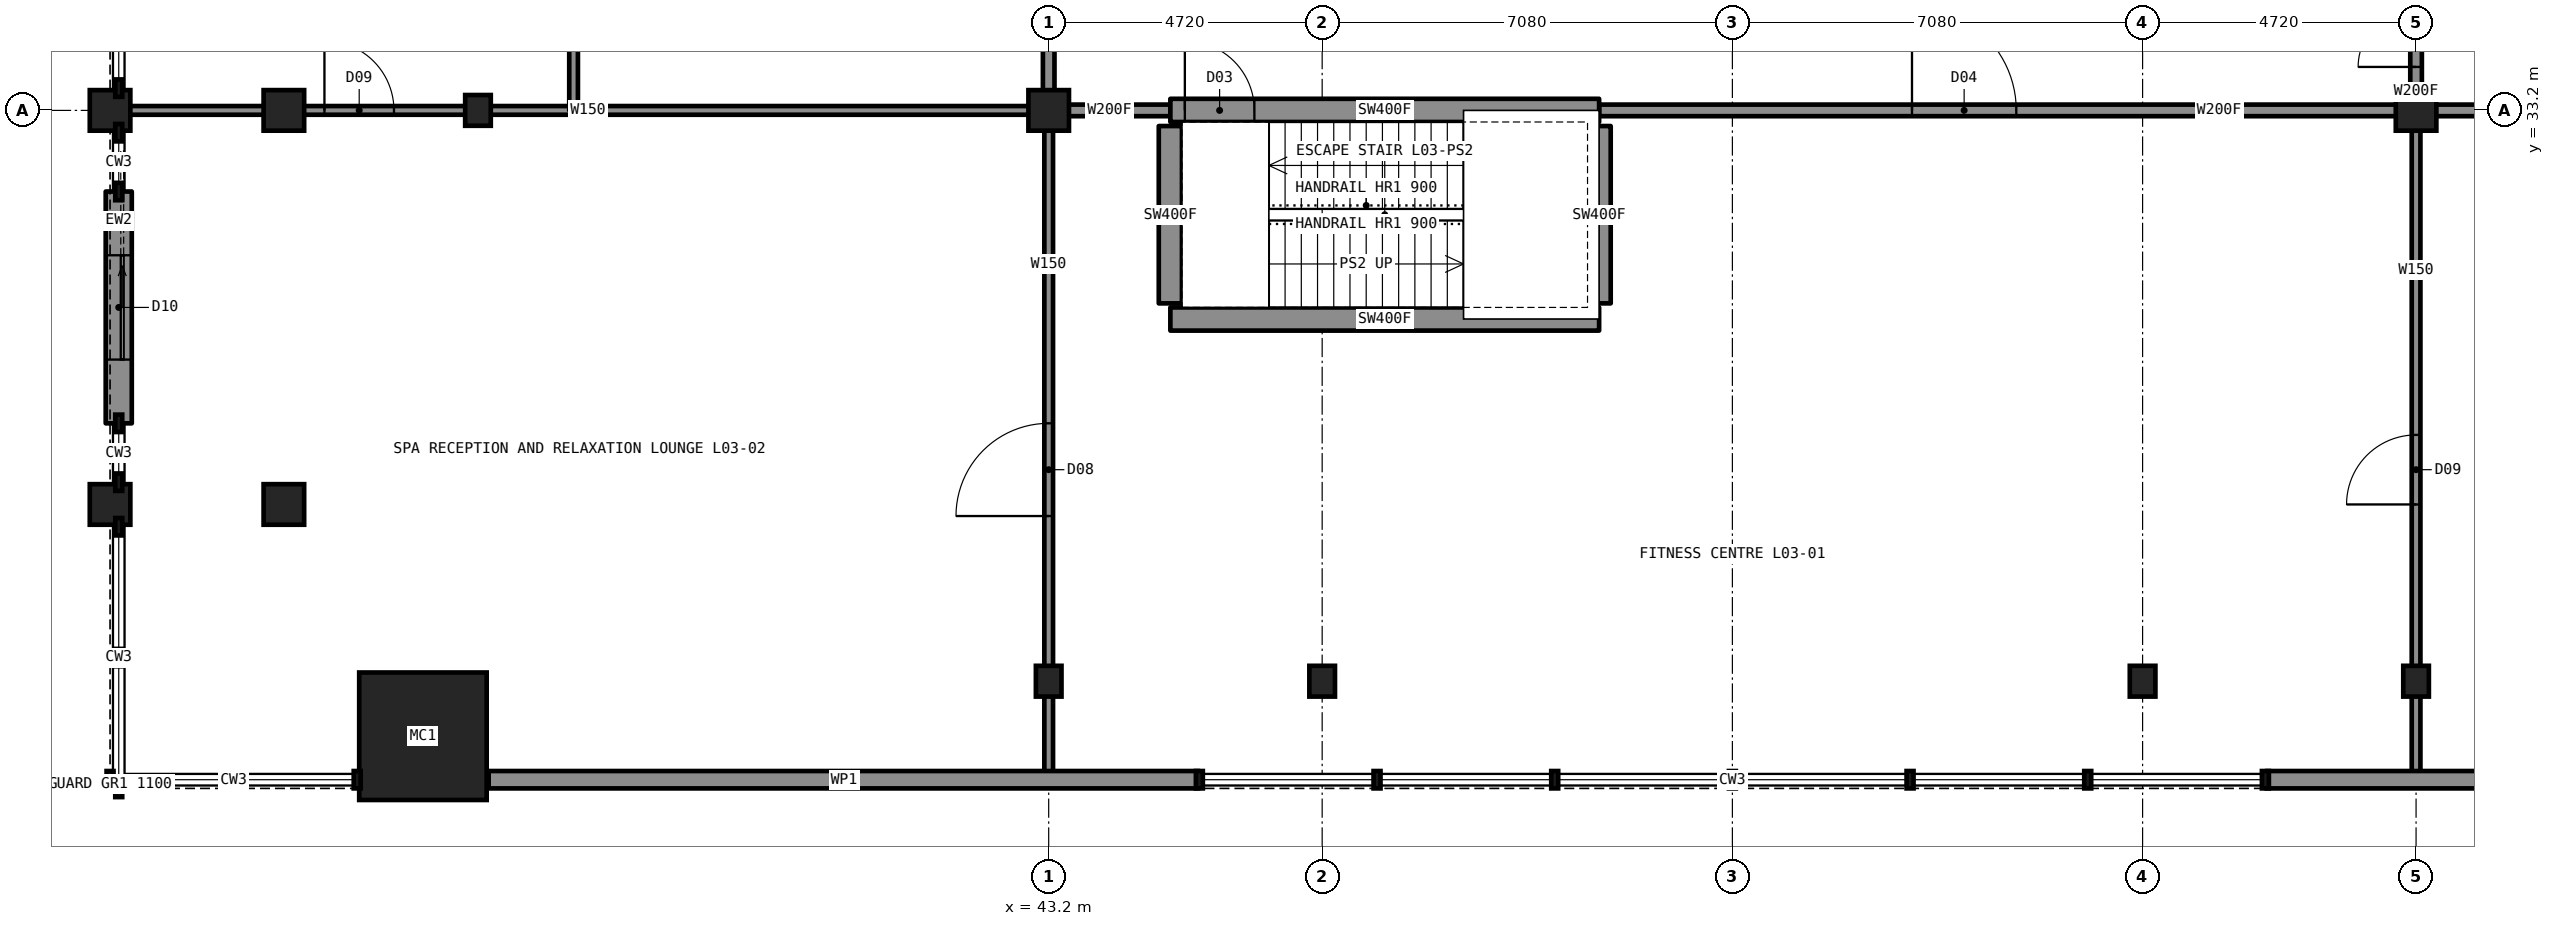
"""IFC4 building model, lengths in metres.
Left out: names, types, materials, properties, quantities, classifications, styles, units other than length and angle.
Written with IfcOpenShell. Run it as: python <this file> out.ifc"""

import sys

from ifc_helpers import new_model, si_unit, direction, frame, frame_2d, origin, origin_2d, place, context, subcontext, project, spatial, rectangle, hollow_rectangle, i_section, extrude, element, fill, save


model = new_model("IFC4")
c1 = context("Model", 3, precision=1e-05, world=origin(), true_north=direction((0.0, 1.0)))
c2 = subcontext(c1, "Body", "Model", "MODEL_VIEW")
j1 = project(units=[si_unit("LENGTHUNIT", "METRE"), si_unit("PLANEANGLEUNIT", "RADIAN")], contexts=[c1])
p1 = place(None, origin())
s1 = spatial("IfcSite", under=j1, at=p1, CompositionType="ELEMENT")
p2 = place(p1, origin())
s2 = spatial("IfcBuilding", under=s1, at=p2, CompositionType="ELEMENT")
p3 = place(p2, frame((0.0, 0.0, 16.0)))
s3 = spatial("IfcBuildingStorey", under=s2, at=p3, CompositionType="ELEMENT", Elevation=16.0)
for number, where, z_axis, x_axis in (
    (1, (33.35, 33.2, 0.0), (0.0, 0.0, 1.0), (1.0, 0.0, 0.0)),
    (2, (43.2, 23.35, 0.0), (0.0, 0.0, 1.0), (1.0, 0.0, 0.0)),
    (3, (47.92, 23.35, 0.0), (0.0, 0.0, 1.0), (1.0, 0.0, 0.0)),
    (4, (62.08, 23.35, 0.0), (0.0, 0.0, 1.0), (1.0, 0.0, 0.0)),
    (5, (66.8, 23.35, 0.0), (0.0, 0.0, 1.0), (1.0, 0.0, 0.0)),
):
    element("IfcColumn", number, at=place(p3, frame(where, z_axis=z_axis, x_axis=x_axis)), inside=s3, PredefinedType="COLUMN", context=c2, shape_type="SweptSolid", body=[
        extrude(i_section(OverallWidth=0.442, OverallDepth=0.531, WebThickness=0.066, FlangeThickness=0.106, at=origin_2d()), origin(), (0.0, 0.0, 1.0), 4.5),
    ])
for number, where, z_axis, x_axis in (
    (6, (43.2, 33.2, 0.0), (0.0, 0.0, 1.0), (1.0, 0.0, 0.0)),
    (7, (66.8, 33.2, 0.0), (0.0, 0.0, 1.0), (1.0, 0.0, 0.0)),
):
    element("IfcColumn", number, at=place(p3, frame(where, z_axis=z_axis, x_axis=x_axis)), inside=s3, PredefinedType="COLUMN", context=c2, shape_type="SweptSolid", body=[
        extrude(hollow_rectangle(XDim=0.7, YDim=0.7, WallThickness=0.06, at=origin_2d()), origin(), (0.0, 0.0, 1.0), 4.5),
    ])
p4 = place(p3, frame((32.4, 22.4, 0.0), z_axis=(0.0, 0.0, 1.0), x_axis=(1.0, 0.0, 0.0)))
e8 = element("IfcColumn", 8, at=p4, inside=s3, PredefinedType="COLUMN", context=c2, shape_type="SweptSolid", body=[
    extrude(hollow_rectangle(XDim=2.2, YDim=2.2, WallThickness=0.15, at=origin_2d()), origin(), (0.0, 0.0, 1.0), 4.5),
])
for number, where, z_axis, x_axis in (
    (9, (27.0, 26.4, 0.0), (0.0, 0.0, 1.0), (1.0, 0.0, 0.0)),
    (10, (27.0, 33.2, 0.0), (0.0, 0.0, 1.0), (1.0, 0.0, 0.0)),
    (11, (30.0, 26.4, 0.0), (0.0, 0.0, 1.0), (1.0, 0.0, 0.0)),
    (12, (30.0, 33.2, 0.0), (0.0, 0.0, 1.0), (1.0, 0.0, 0.0)),
):
    element("IfcColumn", number, at=place(p3, frame(where, z_axis=z_axis, x_axis=x_axis)), inside=s3, PredefinedType="COLUMN", context=c2, shape_type="SweptSolid", body=[
        extrude(rectangle(XDim=0.7, YDim=0.7, at=origin_2d()), origin(), (0.0, 0.0, 1.0), 4.5),
    ])
p5 = place(p3, frame((43.2, 33.2, 0.0), z_axis=(0.0, 0.0, 1.0), x_axis=(1.0, 0.0, 0.0)))
e13 = element("IfcWall", 13, at=p5, inside=s3, PredefinedType="PARTITIONING", context=c2, shape_type="SweptSolid", body=[
    extrude(rectangle(XDim=2.1, YDim=0.2, at=frame_2d((1.05, 0.0))), origin(), (0.0, 0.0, 1.0), 4.15),
])
p6 = place(p3, frame((52.7, 33.2, 0.0), z_axis=(0.0, 0.0, 1.0), x_axis=(1.0, 0.0, 0.0)))
e14 = element("IfcWall", 14, at=p6, inside=s3, PredefinedType="PARTITIONING", context=c2, shape_type="SweptSolid", body=[
    extrude(rectangle(XDim=14.1, YDim=0.2, at=frame_2d((7.05, 0.0))), origin(), (0.0, 0.0, 1.0), 4.15),
])
p7 = place(p6, frame((5.4, 0.0, 0.0)))
e15 = element("IfcOpeningElement", 15, at=p7, cuts=e14, PredefinedType="OPENING", context=c2, shape_type="SweptSolid", body=[
    extrude(rectangle(XDim=1.8, YDim=2.2, at=frame_2d((0.9, 1.1))), frame((0.0, 0.11, 0.0), z_axis=(0.0, -1.0, 0.0), x_axis=(1.0, 0.0, 0.0)), (0.0, 0.0, 1.0), 0.22),
])
p8 = place(p3, frame((66.8, 33.2, 0.0), z_axis=(0.0, 0.0, 1.0), x_axis=(1.0, 0.0, 0.0)))
e16 = element("IfcWall", 16, at=p8, inside=s3, PredefinedType="PARTITIONING", context=c2, shape_type="SweptSolid", body=[
    extrude(rectangle(XDim=12.9, YDim=0.2, at=frame_2d((6.45, 0.0))), origin(), (0.0, 0.0, 1.0), 4.15),
])
p9 = place(p3, frame((27.3, 33.2, 0.0), z_axis=(0.0, 0.0, 1.0), x_axis=(1.0, 0.0, 0.0)))
e17 = element("IfcWall", 17, at=p9, inside=s3, PredefinedType="PARTITIONING", context=c2, shape_type="SweptSolid", body=[
    extrude(rectangle(XDim=15.9, YDim=0.15, at=frame_2d((7.95, 0.0))), origin(), (0.0, 0.0, 1.0), 4.15),
])
p10 = place(p9, frame((3.4, 0.0, 0.0)))
e18 = element("IfcOpeningElement", 18, at=p10, cuts=e17, PredefinedType="OPENING", context=c2, shape_type="SweptSolid", body=[
    extrude(rectangle(XDim=1.2, YDim=2.2, at=frame_2d((0.6, 1.1))), frame((0.0, 0.085, 0.0), z_axis=(0.0, -1.0, 0.0), x_axis=(1.0, 0.0, 0.0)), (0.0, 0.0, 1.0), 0.17),
])
p11 = place(p3, frame((45.3, 33.2, 0.0), z_axis=(0.0, 0.0, 1.0), x_axis=(1.0, 0.0, 0.0)))
e19 = element("IfcWall", 19, at=p11, inside=s3, PredefinedType="SHEAR", context=c2, shape_type="SweptSolid", body=[
    extrude(rectangle(XDim=7.4, YDim=0.4, at=frame_2d((3.7, 0.0))), origin(), (0.0, 0.0, 1.0), 4.5),
])
p12 = place(p11, frame((0.25, 0.0, 0.0)))
e20 = element("IfcOpeningElement", 20, at=p12, cuts=e19, PredefinedType="OPENING", context=c2, shape_type="SweptSolid", body=[
    extrude(rectangle(XDim=1.2, YDim=2.2, at=frame_2d((0.6, 1.1))), frame((0.0, 0.21, 0.0), z_axis=(0.0, -1.0, 0.0), x_axis=(1.0, 0.0, 0.0)), (0.0, 0.0, 1.0), 0.42),
])
p13 = place(p3, frame((45.3, 29.6, 0.0), z_axis=(0.0, 0.0, 1.0), x_axis=(1.0, 0.0, 0.0)))
e21 = element("IfcWall", 21, at=p13, inside=s3, PredefinedType="SHEAR", context=c2, shape_type="SweptSolid", body=[
    extrude(rectangle(XDim=7.4, YDim=0.4, at=frame_2d((3.7, 0.0))), origin(), (0.0, 0.0, 1.0), 4.5),
])
p14 = place(p3, frame((43.2, 33.2, 0.0), z_axis=(0.0, 0.0, 1.0), x_axis=(0.0, 1.0, 0.0)))
e22 = element("IfcWall", 22, at=p14, inside=s3, PredefinedType="PARTITIONING", context=c2, shape_type="SweptSolid", body=[
    extrude(rectangle(XDim=14.1, YDim=0.2, at=frame_2d((7.05, 0.0))), origin(), (0.0, 0.0, 1.0), 4.15),
])
p15 = place(p14, frame((12.4, 0.0, 0.0)))
e23 = element("IfcOpeningElement", 23, at=p15, cuts=e22, PredefinedType="OPENING", context=c2, shape_type="SweptSolid", body=[
    extrude(rectangle(XDim=1.0, YDim=2.1, at=frame_2d((0.5, 1.05))), frame((0.0, 0.11, 0.0), z_axis=(0.0, -1.0, 0.0), x_axis=(1.0, 0.0, 0.0)), (0.0, 0.0, 1.0), 0.22),
])
p16 = place(p14, frame((2.45, 0.0, 0.0)))
e24 = element("IfcOpeningElement", 24, at=p16, cuts=e22, PredefinedType="OPENING", context=c2, shape_type="SweptSolid", body=[
    extrude(rectangle(XDim=0.9, YDim=2.1, at=frame_2d((0.45, 1.05))), frame((0.0, 0.11, 0.0), z_axis=(0.0, -1.0, 0.0), x_axis=(1.0, 0.0, 0.0)), (0.0, 0.0, 1.0), 0.22),
])
p17 = place(p14, frame((8.25, 0.0, 0.0)))
e25 = element("IfcOpeningElement", 25, at=p17, cuts=e22, PredefinedType="OPENING", context=c2, shape_type="SweptSolid", body=[
    extrude(rectangle(XDim=0.9, YDim=2.1, at=frame_2d((0.45, 1.05))), frame((0.0, 0.11, 0.0), z_axis=(0.0, -1.0, 0.0), x_axis=(1.0, 0.0, 0.0)), (0.0, 0.0, 1.0), 0.22),
])
p18 = place(p3, frame((43.2, 21.755, 0.0), z_axis=(0.0, 0.0, 1.0), x_axis=(0.0, 1.0, 0.0)))
e26 = element("IfcWall", 26, at=p18, inside=s3, PredefinedType="PARTITIONING", context=c2, shape_type="SweptSolid", body=[
    extrude(rectangle(XDim=11.445, YDim=0.15, at=frame_2d((5.723, 0.0))), origin(), (0.0, 0.0, 1.0), 4.15),
])
p19 = place(p18, frame((4.445, 0.0, 0.0)))
e27 = element("IfcOpeningElement", 27, at=p19, cuts=e26, PredefinedType="OPENING", context=c2, shape_type="SweptSolid", body=[
    extrude(rectangle(XDim=1.6, YDim=2.4, at=frame_2d((0.8, 1.2))), frame((0.0, 0.085, 0.0), z_axis=(0.0, -1.0, 0.0), x_axis=(1.0, 0.0, 0.0)), (0.0, 0.0, 1.0), 0.17),
])
p20 = place(p3, frame((52.7, 29.87, 0.0), z_axis=(0.0, 0.0, 1.0), x_axis=(0.0, 1.0, 0.0)))
e28 = element("IfcWall", 28, at=p20, inside=s3, PredefinedType="SHEAR", context=c2, shape_type="SweptSolid", body=[
    extrude(rectangle(XDim=3.06, YDim=0.4, at=frame_2d((1.53, 0.0))), origin(), (0.0, 0.0, 1.0), 4.5),
])
p21 = place(p3, frame((35.0, 33.2, 0.0), z_axis=(0.0, 0.0, 1.0), x_axis=(0.0, 1.0, 0.0)))
e29 = element("IfcWall", 29, at=p21, inside=s3, PredefinedType="PARTITIONING", context=c2, shape_type="SweptSolid", body=[
    extrude(rectangle(XDim=23.6, YDim=0.15, at=frame_2d((11.8, 0.0))), origin(), (0.0, 0.0, 1.0), 4.15),
])
p22 = place(p3, frame((45.3, 29.87, 0.0), z_axis=(0.0, 0.0, 1.0), x_axis=(0.0, 1.0, 0.0)))
e30 = element("IfcWall", 30, at=p22, inside=s3, PredefinedType="SHEAR", context=c2, shape_type="SweptSolid", body=[
    extrude(rectangle(XDim=3.06, YDim=0.4, at=frame_2d((1.53, 0.0))), origin(), (0.0, 0.0, 1.0), 4.5),
])
p23 = place(p3, frame((66.8, 33.2, 0.0), z_axis=(0.0, 0.0, 1.0), x_axis=(0.0, 1.0, 0.0)))
e31 = element("IfcWall", 31, at=p23, inside=s3, PredefinedType="PARTITIONING", context=c2, shape_type="SweptSolid", body=[
    extrude(rectangle(XDim=2.1, YDim=0.2, at=frame_2d((1.05, 0.0))), origin(), (0.0, 0.0, 1.0), 4.15),
])
p24 = place(p23, frame((0.75, 0.0, 0.0)))
e32 = element("IfcOpeningElement", 32, at=p24, cuts=e31, PredefinedType="OPENING", context=c2, shape_type="SweptSolid", body=[
    extrude(rectangle(XDim=1.0, YDim=2.1, at=frame_2d((0.5, 1.05))), frame((0.0, 0.11, 0.0), z_axis=(0.0, -1.0, 0.0), x_axis=(1.0, 0.0, 0.0)), (0.0, 0.0, 1.0), 0.22),
])
p25 = place(p3, frame((66.8, 21.755, 0.0), z_axis=(0.0, 0.0, 1.0), x_axis=(0.0, 1.0, 0.0)))
e33 = element("IfcWall", 33, at=p25, inside=s3, PredefinedType="PARTITIONING", context=c2, shape_type="SweptSolid", body=[
    extrude(rectangle(XDim=11.445, YDim=0.15, at=frame_2d((5.723, 0.0))), origin(), (0.0, 0.0, 1.0), 4.15),
])
p26 = place(p25, frame((4.645, 0.0, 0.0)))
e34 = element("IfcOpeningElement", 34, at=p26, cuts=e33, PredefinedType="OPENING", context=c2, shape_type="SweptSolid", body=[
    extrude(rectangle(XDim=1.2, YDim=2.2, at=frame_2d((0.6, 1.1))), frame((0.0, 0.085, 0.0), z_axis=(0.0, -1.0, 0.0), x_axis=(1.0, 0.0, 0.0)), (0.0, 0.0, 1.0), 0.17),
])
p27 = place(p3, frame((27.15, 31.8, 0.0), z_axis=(0.0, 0.0, 1.0), x_axis=(0.0, -1.0, 0.0)))
e35 = element("IfcWall", 35, at=p27, inside=s3, PredefinedType="SOLIDWALL", context=c2, shape_type="SweptSolid", body=[
    extrude(rectangle(XDim=4.0, YDim=0.45, at=frame_2d((2.0, 0.0))), origin(), (0.0, 0.0, 1.0), 4.15),
])
p28 = place(p27, frame((1.1, 0.0, 0.0)))
e36 = element("IfcOpeningElement", 36, at=p28, cuts=e35, PredefinedType="OPENING", context=c2, shape_type="SweptSolid", body=[
    extrude(rectangle(XDim=1.8, YDim=2.4, at=frame_2d((0.9, 1.2))), frame((0.0, 0.235, 0.0), z_axis=(0.0, -1.0, 0.0), x_axis=(1.0, 0.0, 0.0)), (0.0, 0.0, 1.0), 0.47),
])
for number, where, z_axis, x_axis in (
    (37, (33.534, 21.65, 0.0), (0.0, 0.0, 1.0), (1.0, 0.0, 0.0)),
    (38, (64.199, 21.65, 0.0), (0.0, 0.0, 1.0), (1.0, 0.0, 0.0)),
):
    element("IfcWall", number, at=place(p3, frame(where, z_axis=z_axis, x_axis=x_axis)), inside=s3, PredefinedType="SOLIDWALL", context=c2, shape_type="SweptSolid", body=[
        extrude(rectangle(XDim=12.266, YDim=0.3, at=frame_2d((6.133, 0.0))), origin(), (0.0, 0.0, 1.0), 4.15),
    ])
p29 = place(p12, origin())
e39 = element("IfcDoor", 39, at=p29, inside=s3, OperationType="SINGLE_SWING_LEFT", PredefinedType="DOOR", context=c2, shape_type="SweptSolid", body=[
    extrude(rectangle(XDim=1.2, YDim=2.2, at=frame_2d((0.6, 1.1))), frame((0.0, 0.025, 0.0), z_axis=(0.0, -1.0, 0.0), x_axis=(1.0, 0.0, 0.0)), (0.0, 0.0, 1.0), 0.05),
])
fill(e20, e39)
p30 = place(p7, origin())
e40 = element("IfcDoor", 40, at=p30, inside=s3, OperationType="DOUBLE_DOOR_SINGLE_SWING", PredefinedType="DOOR", context=c2, shape_type="SweptSolid", body=[
    extrude(rectangle(XDim=1.8, YDim=2.2, at=frame_2d((0.9, 1.1))), frame((0.0, 0.025, 0.0), z_axis=(0.0, -1.0, 0.0), x_axis=(1.0, 0.0, 0.0)), (0.0, 0.0, 1.0), 0.05),
])
fill(e15, e40)
p31 = place(p19, origin())
e41 = element("IfcDoor", 41, at=p31, inside=s3, OperationType="DOUBLE_DOOR_SINGLE_SWING", PredefinedType="DOOR", context=c2, shape_type="SweptSolid", body=[
    extrude(rectangle(XDim=1.6, YDim=2.4, at=frame_2d((0.8, 1.2))), frame((0.0, 0.025, 0.0), z_axis=(0.0, -1.0, 0.0), x_axis=(1.0, 0.0, 0.0)), (0.0, 0.0, 1.0), 0.05),
])
fill(e27, e41)
p32 = place(p26, origin())
e42 = element("IfcDoor", 42, at=p32, inside=s3, OperationType="SINGLE_SWING_LEFT", PredefinedType="DOOR", context=c2, shape_type="SweptSolid", body=[
    extrude(rectangle(XDim=1.2, YDim=2.2, at=frame_2d((0.6, 1.1))), frame((0.0, 0.025, 0.0), z_axis=(0.0, -1.0, 0.0), x_axis=(1.0, 0.0, 0.0)), (0.0, 0.0, 1.0), 0.05),
])
fill(e34, e42)
p33 = place(p10, origin())
e43 = element("IfcDoor", 43, at=p33, inside=s3, OperationType="SINGLE_SWING_LEFT", PredefinedType="DOOR", context=c2, shape_type="SweptSolid", body=[
    extrude(rectangle(XDim=1.2, YDim=2.2, at=frame_2d((0.6, 1.1))), frame((0.0, 0.025, 0.0), z_axis=(0.0, -1.0, 0.0), x_axis=(1.0, 0.0, 0.0)), (0.0, 0.0, 1.0), 0.05),
])
fill(e18, e43)
p34 = place(p24, origin())
e44 = element("IfcDoor", 44, at=p34, inside=s3, OperationType="SINGLE_SWING_LEFT", PredefinedType="DOOR", context=c2, shape_type="SweptSolid", body=[
    extrude(rectangle(XDim=1.0, YDim=2.1, at=frame_2d((0.5, 1.05))), frame((0.0, 0.025, 0.0), z_axis=(0.0, -1.0, 0.0), x_axis=(1.0, 0.0, 0.0)), (0.0, 0.0, 1.0), 0.05),
])
fill(e32, e44)
p35 = place(p28, origin())
e45 = element("IfcDoor", 45, at=p35, inside=s3, OperationType="SLIDING_TO_LEFT", PredefinedType="DOOR", context=c2, shape_type="SweptSolid", body=[
    extrude(rectangle(XDim=1.8, YDim=2.4, at=frame_2d((0.9, 1.2))), frame((0.0, 0.025, 0.0), z_axis=(0.0, -1.0, 0.0), x_axis=(1.0, 0.0, 0.0)), (0.0, 0.0, 1.0), 0.05),
])
fill(e36, e45)
save(model, sys.argv[1])
